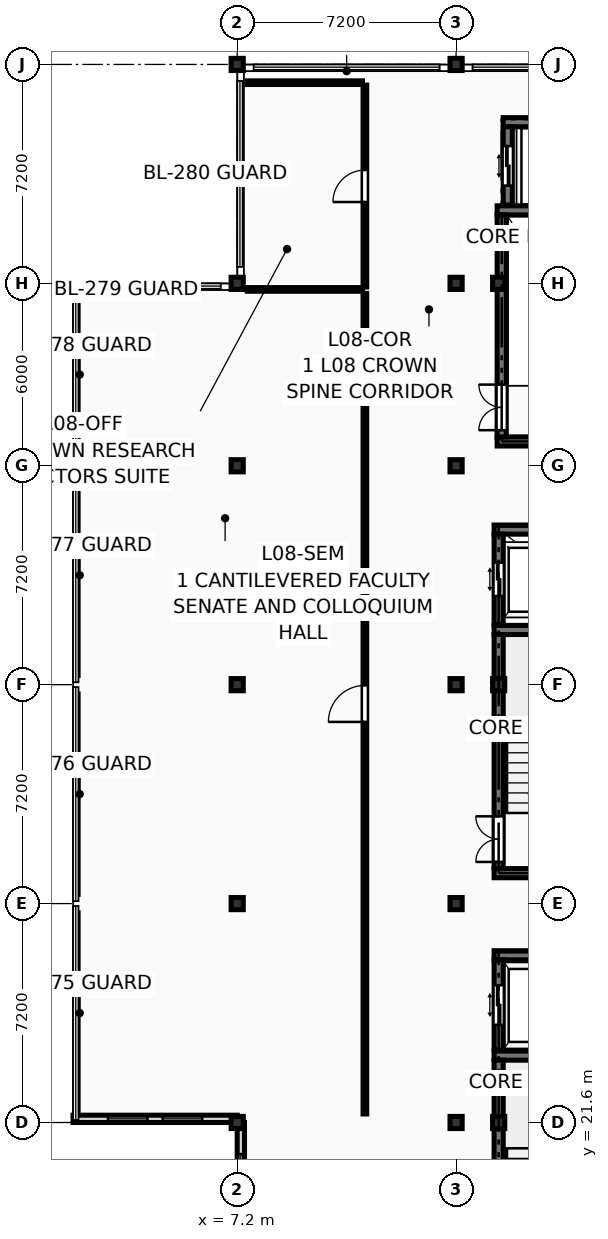
"""IFC4 building model, lengths in metres.
Left out: names, types, materials, properties, quantities, classifications, styles, units other than length and angle.
Written with IfcOpenShell. Run it as: python <this file> out.ifc"""

import sys

from ifc_helpers import new_model, si_unit, direction, frame, frame_2d, origin, origin_2d, place, context, subcontext, project, spatial, rectangle, extrude, element, fill, save


model = new_model("IFC4")
c1 = context("Model", 3, precision=1e-05, world=origin(), true_north=direction((0.0, 1.0)))
c2 = subcontext(c1, "Body", "Model", "MODEL_VIEW")
j1 = project(units=[si_unit("LENGTHUNIT", "METRE"), si_unit("PLANEANGLEUNIT", "RADIAN")], contexts=[c1])
p1 = place(None, origin())
s1 = spatial("IfcSite", under=j1, at=p1, CompositionType="ELEMENT")
p2 = place(p1, origin())
s2 = spatial("IfcBuilding", under=s1, at=p2, CompositionType="ELEMENT")
p3 = place(p2, frame((0.0, 0.0, 29.7)))
s3 = spatial("IfcBuildingStorey", under=s2, at=p3, CompositionType="ELEMENT", Elevation=29.7)
for number, where, z_axis, x_axis in (
    (1, (7.2, 21.6, 0.0), (0.0, 0.0, 1.0), (1.0, 0.0, 0.0)),
    (2, (7.2, 28.8, 0.0), (0.0, 0.0, 1.0), (1.0, 0.0, 0.0)),
    (3, (7.2, 36.0, 0.0), (0.0, 0.0, 1.0), (1.0, 0.0, 0.0)),
    (4, (7.2, 43.2, 0.0), (0.0, 0.0, 1.0), (1.0, 0.0, 0.0)),
    (5, (7.2, 49.2, 0.0), (0.0, 0.0, 1.0), (1.0, 0.0, 0.0)),
    (6, (7.2, 56.4, 0.0), (0.0, 0.0, 1.0), (1.0, 0.0, 0.0)),
    (7, (14.4, 21.6, 0.0), (0.0, 0.0, 1.0), (1.0, 0.0, 0.0)),
    (8, (14.4, 28.8, 0.0), (0.0, 0.0, 1.0), (1.0, 0.0, 0.0)),
    (9, (14.4, 36.0, 0.0), (0.0, 0.0, 1.0), (1.0, 0.0, 0.0)),
    (10, (14.4, 43.2, 0.0), (0.0, 0.0, 1.0), (1.0, 0.0, 0.0)),
    (11, (14.4, 49.2, 0.0), (0.0, 0.0, 1.0), (1.0, 0.0, 0.0)),
    (12, (14.4, 56.4, 0.0), (0.0, 0.0, 1.0), (1.0, 0.0, 0.0)),
    (13, (15.8, 21.6, 0.0), (0.0, 0.0, 1.0), (1.0, 0.0, 0.0)),
    (14, (15.8, 36.0, 0.0), (0.0, 0.0, 1.0), (1.0, 0.0, 0.0)),
    (15, (15.8, 49.2, 0.0), (0.0, 0.0, 1.0), (1.0, 0.0, 0.0)),
):
    element("IfcColumn", number, at=place(p3, frame(where, z_axis=z_axis, x_axis=x_axis)), inside=s3, PredefinedType="COLUMN", context=c2, shape_type="SweptSolid", body=[
        extrude(rectangle(XDim=0.4, YDim=0.4, at=origin_2d()), origin(), (0.0, 0.0, 1.0), 3.6),
    ])
p4 = place(p3, frame((7.32, 14.4, 0.0), z_axis=(0.0, 0.0, 1.0), x_axis=(0.0, 1.0, 0.0)))
e16 = element("IfcWall", 16, at=p4, inside=s3, PredefinedType="SOLIDWALL", context=c2, shape_type="SweptSolid", body=[
    extrude(rectangle(XDim=7.2, YDim=0.24, at=frame_2d((3.6, 0.0))), origin(), (0.0, 0.0, 1.0), 2.85),
])
p5 = place(p4, frame((1.038, 0.0, 0.18)))
e17 = element("IfcOpeningElement", 17, at=p5, cuts=e16, PredefinedType="OPENING", context=c2, shape_type="SweptSolid", body=[
    extrude(rectangle(XDim=1.45, YDim=2.5, at=frame_2d((0.725, 1.25))), frame((0.0, 0.132, 0.0), z_axis=(0.0, -1.0, 0.0), x_axis=(1.0, 0.0, 0.0)), (0.0, 0.0, 1.0), 0.264),
])
p6 = place(p4, frame((2.875, 0.0, 0.18)))
e18 = element("IfcOpeningElement", 18, at=p6, cuts=e16, PredefinedType="OPENING", context=c2, shape_type="SweptSolid", body=[
    extrude(rectangle(XDim=1.45, YDim=2.5, at=frame_2d((0.725, 1.25))), frame((0.0, 0.132, 0.0), z_axis=(0.0, -1.0, 0.0), x_axis=(1.0, 0.0, 0.0)), (0.0, 0.0, 1.0), 0.264),
])
p7 = place(p4, frame((4.712, 0.0, 0.18)))
e19 = element("IfcOpeningElement", 19, at=p7, cuts=e16, PredefinedType="OPENING", context=c2, shape_type="SweptSolid", body=[
    extrude(rectangle(XDim=1.45, YDim=2.5, at=frame_2d((0.725, 1.25))), frame((0.0, 0.132, 0.0), z_axis=(0.0, -1.0, 0.0), x_axis=(1.0, 0.0, 0.0)), (0.0, 0.0, 1.0), 0.264),
])
p8 = place(p3, frame((1.8, 21.72, 0.0), z_axis=(0.0, 0.0, 1.0), x_axis=(1.0, 0.0, 0.0)))
e20 = element("IfcWall", 20, at=p8, inside=s3, PredefinedType="SOLIDWALL", context=c2, shape_type="SweptSolid", body=[
    extrude(rectangle(XDim=5.4, YDim=0.24, at=frame_2d((2.7, 0.0))), origin(), (0.0, 0.0, 1.0), 2.706),
])
p9 = place(p8, frame((1.15, 0.0, 0.18)))
e21 = element("IfcOpeningElement", 21, at=p9, cuts=e20, PredefinedType="OPENING", context=c2, shape_type="SweptSolid", body=[
    extrude(rectangle(XDim=1.3, YDim=2.35, at=frame_2d((0.65, 1.175))), frame((0.0, 0.132, 0.0), z_axis=(0.0, -1.0, 0.0), x_axis=(1.0, 0.0, 0.0)), (0.0, 0.0, 1.0), 0.264),
])
p10 = place(p8, frame((2.95, 0.0, 0.18)))
e22 = element("IfcOpeningElement", 22, at=p10, cuts=e20, PredefinedType="OPENING", context=c2, shape_type="SweptSolid", body=[
    extrude(rectangle(XDim=1.3, YDim=2.35, at=frame_2d((0.65, 1.175))), frame((0.0, 0.132, 0.0), z_axis=(0.0, -1.0, 0.0), x_axis=(1.0, 0.0, 0.0)), (0.0, 0.0, 1.0), 0.264),
])
p11 = place(p3, frame((15.65, 23.8, 0.0), z_axis=(0.0, 0.0, 1.0), x_axis=(1.0, 0.0, 0.0)))
e23 = element("IfcWall", 23, at=p11, inside=s3, PredefinedType="SHEAR", context=c2, shape_type="SweptSolid", body=[
    extrude(rectangle(XDim=4.82, YDim=0.3, at=frame_2d((2.41, 0.0))), origin(), (0.0, 0.0, 1.0), 3.4),
])
p12 = place(p3, frame((15.8, 15.95, 0.0), z_axis=(0.0, 0.0, 1.0), x_axis=(0.0, 1.0, 0.0)))
e24 = element("IfcWall", 24, at=p12, inside=s3, PredefinedType="SHEAR", context=c2, shape_type="SweptSolid", body=[
    extrude(rectangle(XDim=7.7, YDim=0.3, at=frame_2d((3.85, 0.0))), origin(), (0.0, 0.0, 1.0), 3.4),
])
p13 = place(p12, frame((0.22, 0.0, 0.0)))
e25 = element("IfcOpeningElement", 25, at=p13, cuts=e24, PredefinedType="OPENING", context=c2, shape_type="SweptSolid", body=[
    extrude(rectangle(XDim=1.5, YDim=2.2, at=frame_2d((0.75, 1.1))), frame((0.0, 0.162, 0.0), z_axis=(0.0, -1.0, 0.0), x_axis=(1.0, 0.0, 0.0)), (0.0, 0.0, 1.0), 0.324),
])
for number, where, z_axis, x_axis in (
    (26, (15.65, 29.8, 0.0), (0.0, 0.0, 1.0), (1.0, 0.0, 0.0)),
    (27, (15.65, 37.8, 0.0), (0.0, 0.0, 1.0), (1.0, 0.0, 0.0)),
):
    element("IfcWall", number, at=place(p3, frame(where, z_axis=z_axis, x_axis=x_axis)), inside=s3, PredefinedType="SHEAR", context=c2, shape_type="SweptSolid", body=[
        extrude(rectangle(XDim=4.82, YDim=0.3, at=frame_2d((2.41, 0.0))), origin(), (0.0, 0.0, 1.0), 3.4),
    ])
p14 = place(p3, frame((15.8, 29.95, 0.0), z_axis=(0.0, 0.0, 1.0), x_axis=(0.0, 1.0, 0.0)))
e28 = element("IfcWall", 28, at=p14, inside=s3, PredefinedType="SHEAR", context=c2, shape_type="SweptSolid", body=[
    extrude(rectangle(XDim=7.7, YDim=0.3, at=frame_2d((3.85, 0.0))), origin(), (0.0, 0.0, 1.0), 3.4),
])
p15 = place(p14, frame((0.22, 0.0, 0.0)))
e29 = element("IfcOpeningElement", 29, at=p15, cuts=e28, PredefinedType="OPENING", context=c2, shape_type="SweptSolid", body=[
    extrude(rectangle(XDim=1.5, YDim=2.2, at=frame_2d((0.75, 1.1))), frame((0.0, 0.162, 0.0), z_axis=(0.0, -1.0, 0.0), x_axis=(1.0, 0.0, 0.0)), (0.0, 0.0, 1.0), 0.324),
])
for number, where, z_axis, x_axis in (
    (30, (15.75, 44.0, 0.0), (0.0, 0.0, 1.0), (1.0, 0.0, 0.0)),
    (31, (15.75, 51.6, 0.0), (0.0, 0.0, 1.0), (1.0, 0.0, 0.0)),
):
    element("IfcWall", number, at=place(p3, frame(where, z_axis=z_axis, x_axis=x_axis)), inside=s3, PredefinedType="SHEAR", context=c2, shape_type="SweptSolid", body=[
        extrude(rectangle(XDim=4.42, YDim=0.3, at=frame_2d((2.21, 0.0))), origin(), (0.0, 0.0, 1.0), 3.4),
    ])
p16 = place(p3, frame((15.9, 44.15, 0.0), z_axis=(0.0, 0.0, 1.0), x_axis=(0.0, 1.0, 0.0)))
e32 = element("IfcWall", 32, at=p16, inside=s3, PredefinedType="SHEAR", context=c2, shape_type="SweptSolid", body=[
    extrude(rectangle(XDim=7.3, YDim=0.3, at=frame_2d((3.65, 0.0))), origin(), (0.0, 0.0, 1.0), 3.4),
])
p17 = place(p16, frame((0.22, 0.0, 0.0)))
e33 = element("IfcOpeningElement", 33, at=p17, cuts=e32, PredefinedType="OPENING", context=c2, shape_type="SweptSolid", body=[
    extrude(rectangle(XDim=1.5, YDim=2.2, at=frame_2d((0.75, 1.1))), frame((0.0, 0.162, 0.0), z_axis=(0.0, -1.0, 0.0), x_axis=(1.0, 0.0, 0.0)), (0.0, 0.0, 1.0), 0.324),
])
p18 = place(p3, frame((15.65, 27.1, 0.0), z_axis=(0.0, 0.0, 1.0), x_axis=(1.0, 0.0, 0.0)))
e34 = element("IfcWall", 34, at=p18, inside=s3, PredefinedType="SHEAR", context=c2, shape_type="SweptSolid", body=[
    extrude(rectangle(XDim=2.56, YDim=0.3, at=frame_2d((1.28, 0.0))), origin(), (0.0, 0.0, 1.0), 3.4),
])
p19 = place(p3, frame((15.8, 23.98, 0.0), z_axis=(0.0, 0.0, 1.0), x_axis=(0.0, 1.0, 0.0)))
e35 = element("IfcWall", 35, at=p19, inside=s3, PredefinedType="SHEAR", context=c2, shape_type="SweptSolid", body=[
    extrude(rectangle(XDim=2.97, YDim=0.3, at=frame_2d((1.485, 0.0))), origin(), (0.0, 0.0, 1.0), 3.4),
])
p20 = place(p19, frame((0.835, 0.0, 0.0)))
e36 = element("IfcOpeningElement", 36, at=p20, cuts=e35, PredefinedType="OPENING", context=c2, shape_type="SweptSolid", body=[
    extrude(rectangle(XDim=1.3, YDim=2.25, at=frame_2d((0.65, 1.125))), frame((0.0, 0.162, 0.0), z_axis=(0.0, -1.0, 0.0), x_axis=(1.0, 0.0, 0.0)), (0.0, 0.0, 1.0), 0.324),
])
p21 = place(p3, frame((15.65, 41.1, 0.0), z_axis=(0.0, 0.0, 1.0), x_axis=(1.0, 0.0, 0.0)))
e37 = element("IfcWall", 37, at=p21, inside=s3, PredefinedType="SHEAR", context=c2, shape_type="SweptSolid", body=[
    extrude(rectangle(XDim=2.56, YDim=0.3, at=frame_2d((1.28, 0.0))), origin(), (0.0, 0.0, 1.0), 3.4),
])
p22 = place(p3, frame((15.8, 37.98, 0.0), z_axis=(0.0, 0.0, 1.0), x_axis=(0.0, 1.0, 0.0)))
e38 = element("IfcWall", 38, at=p22, inside=s3, PredefinedType="SHEAR", context=c2, shape_type="SweptSolid", body=[
    extrude(rectangle(XDim=2.97, YDim=0.3, at=frame_2d((1.485, 0.0))), origin(), (0.0, 0.0, 1.0), 3.4),
])
p23 = place(p22, frame((0.935, 0.0, 0.0)))
e39 = element("IfcOpeningElement", 39, at=p23, cuts=e38, PredefinedType="OPENING", context=c2, shape_type="SweptSolid", body=[
    extrude(rectangle(XDim=1.1, YDim=2.2, at=frame_2d((0.55, 1.1))), frame((0.0, 0.162, 0.0), z_axis=(0.0, -1.0, 0.0), x_axis=(1.0, 0.0, 0.0)), (0.0, 0.0, 1.0), 0.324),
])
p24 = place(p3, frame((15.95, 54.5, 0.0), z_axis=(0.0, 0.0, 1.0), x_axis=(1.0, 0.0, 0.0)))
e40 = element("IfcWall", 40, at=p24, inside=s3, PredefinedType="SHEAR", context=c2, shape_type="SweptSolid", body=[
    extrude(rectangle(XDim=3.0, YDim=0.3, at=frame_2d((1.5, 0.0))), origin(), (0.0, 0.0, 1.0), 3.4),
])
p25 = place(p3, frame((16.1, 51.78, 0.0), z_axis=(0.0, 0.0, 1.0), x_axis=(0.0, 1.0, 0.0)))
e41 = element("IfcWall", 41, at=p25, inside=s3, PredefinedType="SHEAR", context=c2, shape_type="SweptSolid", body=[
    extrude(rectangle(XDim=2.57, YDim=0.3, at=frame_2d((1.285, 0.0))), origin(), (0.0, 0.0, 1.0), 3.4),
])
p26 = place(p25, frame((0.635, 0.0, 0.0)))
e42 = element("IfcOpeningElement", 42, at=p26, cuts=e41, PredefinedType="OPENING", context=c2, shape_type="SweptSolid", body=[
    extrude(rectangle(XDim=1.3, YDim=2.25, at=frame_2d((0.65, 1.125))), frame((0.0, 0.162, 0.0), z_axis=(0.0, -1.0, 0.0), x_axis=(1.0, 0.0, 0.0)), (0.0, 0.0, 1.0), 0.324),
])
p27 = place(p3, frame((7.53, 49.0, 0.0), z_axis=(0.0, 0.0, 1.0), x_axis=(1.0, 0.0, 0.0)))
e43 = element("IfcWall", 43, at=p27, inside=s3, PredefinedType="PARTITIONING", context=c2, shape_type="SweptSolid", body=[
    extrude(rectangle(XDim=3.79, YDim=0.12, at=frame_2d((1.895, 0.0))), origin(), (0.0, 0.0, 1.0), 2.701),
])
p28 = place(p3, frame((11.4, 49.08, 0.0), z_axis=(0.0, 0.0, 1.0), x_axis=(0.0, 1.0, 0.0)))
e44 = element("IfcWall", 44, at=p28, inside=s3, PredefinedType="PARTITIONING", context=c2, shape_type="SweptSolid", body=[
    extrude(rectangle(XDim=6.64, YDim=0.12, at=frame_2d((3.32, 0.0))), origin(), (0.0, 0.0, 1.0), 3.385),
])
p29 = place(p28, frame((2.795, 0.0, 0.0)))
e45 = element("IfcOpeningElement", 45, at=p29, cuts=e44, PredefinedType="OPENING", context=c2, shape_type="SweptSolid", body=[
    extrude(rectangle(XDim=1.05, YDim=2.18, at=frame_2d((0.525, 1.09))), frame((0.0, 0.072, 0.0), z_axis=(0.0, -1.0, 0.0), x_axis=(1.0, 0.0, 0.0)), (0.0, 0.0, 1.0), 0.144),
])
p30 = place(p3, frame((7.53, 55.8, 0.0), z_axis=(0.0, 0.0, 1.0), x_axis=(1.0, 0.0, 0.0)))
e46 = element("IfcWall", 46, at=p30, inside=s3, PredefinedType="PARTITIONING", context=c2, shape_type="SweptSolid", body=[
    extrude(rectangle(XDim=3.79, YDim=0.12, at=frame_2d((1.895, 0.0))), origin(), (0.0, 0.0, 1.0), 3.385),
])
p31 = place(p3, frame((11.4, 21.88, 0.0), z_axis=(0.0, 0.0, 1.0), x_axis=(0.0, 1.0, 0.0)))
e47 = element("IfcWall", 47, at=p31, inside=s3, PredefinedType="PARTITIONING", context=c2, shape_type="SweptSolid", body=[
    extrude(rectangle(XDim=26.99, YDim=0.12, at=frame_2d((13.495, 0.0))), origin(), (0.0, 0.0, 1.0), 3.385),
])
p32 = place(p31, frame((12.895, 0.0, 0.0)))
e48 = element("IfcOpeningElement", 48, at=p32, cuts=e47, PredefinedType="OPENING", context=c2, shape_type="SweptSolid", body=[
    extrude(rectangle(XDim=1.2, YDim=2.15, at=frame_2d((0.6, 1.075))), frame((0.0, 0.072, 0.0), z_axis=(0.0, -1.0, 0.0), x_axis=(1.0, 0.0, 0.0)), (0.0, 0.0, 1.0), 0.144),
])
p33 = place(p7, origin())
e49 = element("IfcWindow", 49, at=p33, inside=s3, PartitioningType="SINGLE_PANEL", PredefinedType="WINDOW", context=c2, shape_type="SweptSolid", body=[
    extrude(rectangle(XDim=1.45, YDim=2.5, at=frame_2d((0.725, 1.25))), frame((0.0, 0.03, 0.0), z_axis=(0.0, -1.0, 0.0), x_axis=(1.0, 0.0, 0.0)), (0.0, 0.0, 1.0), 0.06),
])
fill(e19, e49)
p34 = place(p9, origin())
e50 = element("IfcWindow", 50, at=p34, inside=s3, PartitioningType="SINGLE_PANEL", PredefinedType="WINDOW", context=c2, shape_type="SweptSolid", body=[
    extrude(rectangle(XDim=1.3, YDim=2.35, at=frame_2d((0.65, 1.175))), frame((0.0, 0.03, 0.0), z_axis=(0.0, -1.0, 0.0), x_axis=(1.0, 0.0, 0.0)), (0.0, 0.0, 1.0), 0.06),
])
fill(e21, e50)
p35 = place(p10, origin())
e51 = element("IfcWindow", 51, at=p35, inside=s3, PartitioningType="SINGLE_PANEL", PredefinedType="WINDOW", context=c2, shape_type="SweptSolid", body=[
    extrude(rectangle(XDim=1.3, YDim=2.35, at=frame_2d((0.65, 1.175))), frame((0.0, 0.03, 0.0), z_axis=(0.0, -1.0, 0.0), x_axis=(1.0, 0.0, 0.0)), (0.0, 0.0, 1.0), 0.06),
])
fill(e22, e51)
p36 = place(p15, origin())
e52 = element("IfcDoor", 52, at=p36, inside=s3, OperationType="DOUBLE_DOOR_SINGLE_SWING", PredefinedType="DOOR", context=c2, shape_type="SweptSolid", body=[
    extrude(rectangle(XDim=1.5, YDim=2.2, at=frame_2d((0.75, 1.1))), frame((0.0, 0.025, 0.0), z_axis=(0.0, -1.0, 0.0), x_axis=(1.0, 0.0, 0.0)), (0.0, 0.0, 1.0), 0.05),
])
fill(e29, e52)
p37 = place(p17, origin())
e53 = element("IfcDoor", 53, at=p37, inside=s3, OperationType="DOUBLE_DOOR_SINGLE_SWING", PredefinedType="DOOR", context=c2, shape_type="SweptSolid", body=[
    extrude(rectangle(XDim=1.5, YDim=2.2, at=frame_2d((0.75, 1.1))), frame((0.0, 0.025, 0.0), z_axis=(0.0, -1.0, 0.0), x_axis=(1.0, 0.0, 0.0)), (0.0, 0.0, 1.0), 0.05),
])
fill(e33, e53)
p38 = place(p20, origin())
e54 = element("IfcDoor", 54, at=p38, inside=s3, OperationType="DOUBLE_DOOR_SLIDING", PredefinedType="DOOR", context=c2, shape_type="SweptSolid", body=[
    extrude(rectangle(XDim=1.3, YDim=2.25, at=frame_2d((0.65, 1.125))), frame((0.0, 0.025, 0.0), z_axis=(0.0, -1.0, 0.0), x_axis=(1.0, 0.0, 0.0)), (0.0, 0.0, 1.0), 0.05),
])
fill(e36, e54)
p39 = place(p23, origin())
e55 = element("IfcDoor", 55, at=p39, inside=s3, OperationType="DOUBLE_DOOR_SLIDING", PredefinedType="DOOR", context=c2, shape_type="SweptSolid", body=[
    extrude(rectangle(XDim=1.1, YDim=2.2, at=frame_2d((0.55, 1.1))), frame((0.0, 0.025, 0.0), z_axis=(0.0, -1.0, 0.0), x_axis=(1.0, 0.0, 0.0)), (0.0, 0.0, 1.0), 0.05),
])
fill(e39, e55)
p40 = place(p26, origin())
e56 = element("IfcDoor", 56, at=p40, inside=s3, OperationType="DOUBLE_DOOR_SLIDING", PredefinedType="DOOR", context=c2, shape_type="SweptSolid", body=[
    extrude(rectangle(XDim=1.3, YDim=2.25, at=frame_2d((0.65, 1.125))), frame((0.0, 0.025, 0.0), z_axis=(0.0, -1.0, 0.0), x_axis=(1.0, 0.0, 0.0)), (0.0, 0.0, 1.0), 0.05),
])
fill(e42, e56)
p41 = place(p29, origin())
e57 = element("IfcDoor", 57, at=p41, inside=s3, OperationType="SINGLE_SWING_LEFT", PredefinedType="DOOR", context=c2, shape_type="SweptSolid", body=[
    extrude(rectangle(XDim=1.05, YDim=2.18, at=frame_2d((0.525, 1.09))), frame((0.0, 0.025, 0.0), z_axis=(0.0, -1.0, 0.0), x_axis=(1.0, 0.0, 0.0)), (0.0, 0.0, 1.0), 0.05),
])
fill(e45, e57)
p42 = place(p32, origin())
e58 = element("IfcDoor", 58, at=p42, inside=s3, OperationType="SINGLE_SWING_LEFT", PredefinedType="DOOR", context=c2, shape_type="SweptSolid", body=[
    extrude(rectangle(XDim=1.2, YDim=2.15, at=frame_2d((0.6, 1.075))), frame((0.0, 0.025, 0.0), z_axis=(0.0, -1.0, 0.0), x_axis=(1.0, 0.0, 0.0)), (0.0, 0.0, 1.0), 0.05),
])
fill(e48, e58)
save(model, sys.argv[1])
